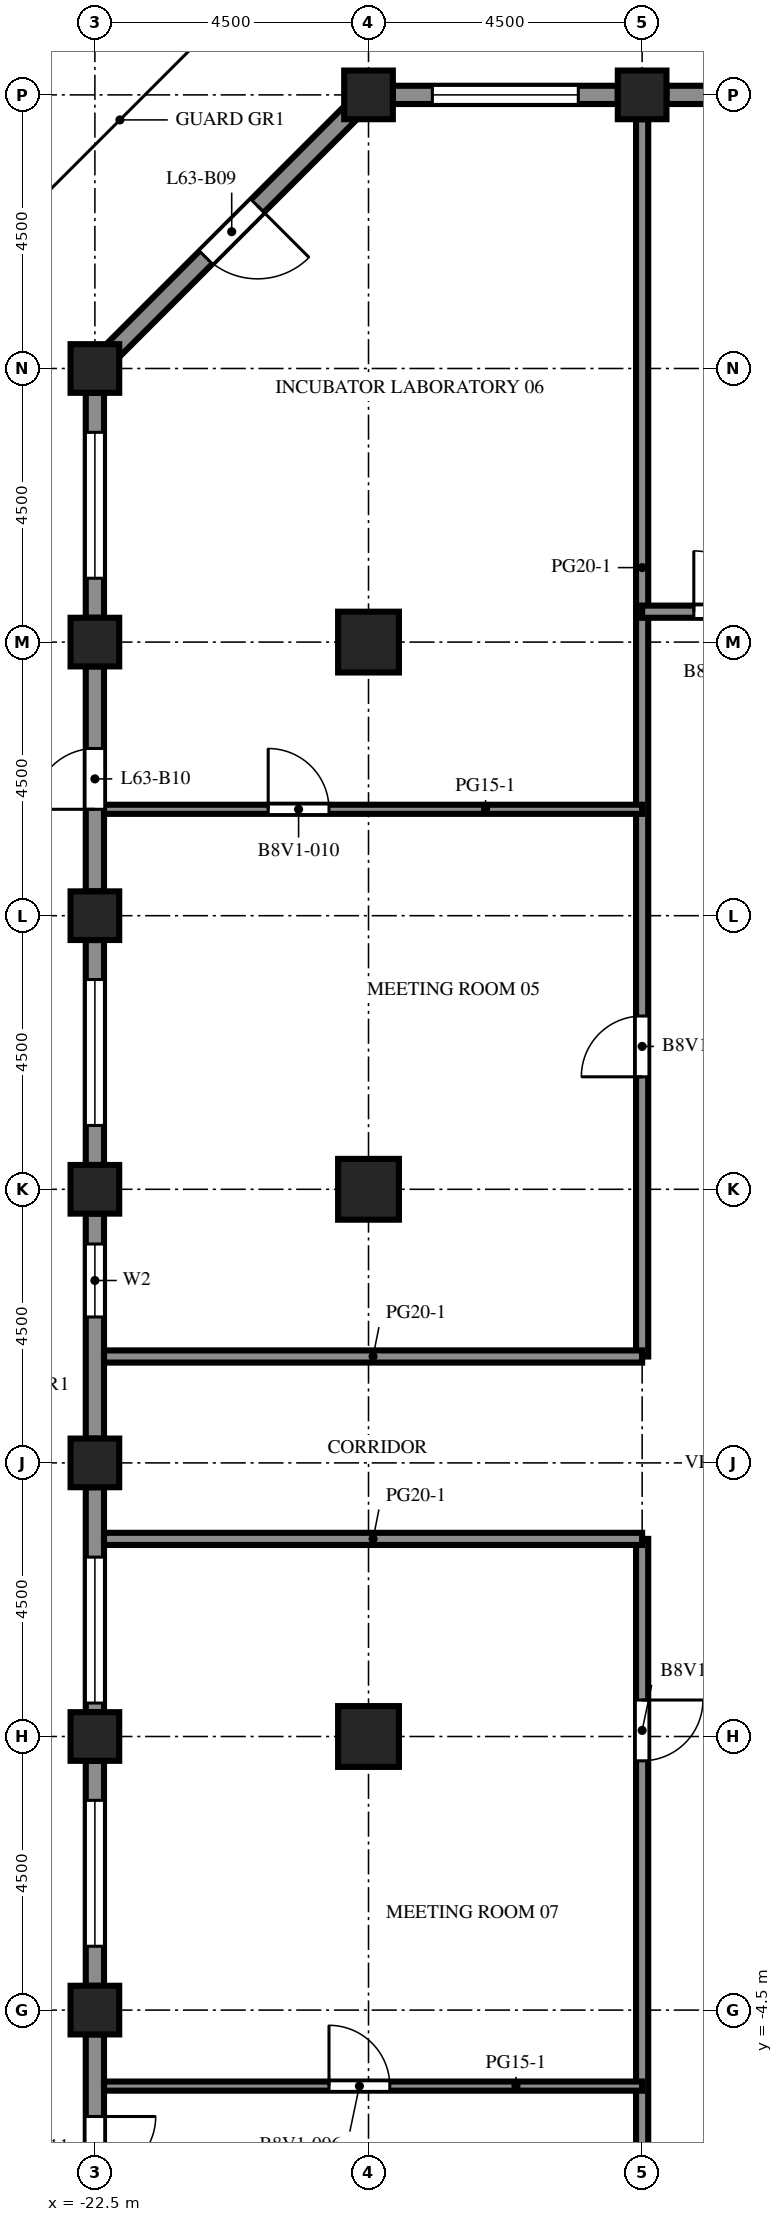
"""IFC4 building model, lengths in metres.
Left out: names, types, materials, properties, quantities, classifications, styles, units other than length and angle.
Written with IfcOpenShell. Run it as: python <this file> out.ifc"""

import sys

from ifc_helpers import new_model, si_unit, direction, frame, frame_2d, origin, origin_2d, place, context, subcontext, project, spatial, rectangle, extrude, element, fill, save


model = new_model("IFC4")
c1 = context("Model", 3, precision=1e-05, world=origin(), true_north=direction((0.0, 1.0)))
c2 = subcontext(c1, "Body", "Model", "MODEL_VIEW")
j1 = project(units=[si_unit("LENGTHUNIT", "METRE"), si_unit("PLANEANGLEUNIT", "RADIAN")], contexts=[c1])
p1 = place(None, origin())
s1 = spatial("IfcSite", under=j1, at=p1, CompositionType="ELEMENT")
p2 = place(p1, origin())
s2 = spatial("IfcBuilding", under=s1, at=p2, CompositionType="ELEMENT")
p3 = place(p2, frame((0.0, 0.0, 278.6)))
s3 = spatial("IfcBuildingStorey", under=s2, at=p3, CompositionType="ELEMENT", Elevation=278.6)
for number, where, z_axis, x_axis in (
    (1, (-22.5, -4.5, 0.0), (0.0, 0.0, 1.0), (1.0, 0.0, 0.0)),
    (2, (-22.5, 0.0, 0.0), (0.0, 0.0, 1.0), (1.0, 0.0, 0.0)),
    (3, (-22.5, 4.5, 0.0), (0.0, 0.0, 1.0), (1.0, 0.0, 0.0)),
    (4, (-22.5, 9.0, 0.0), (0.0, 0.0, 1.0), (1.0, 0.0, 0.0)),
    (5, (-22.5, 13.5, 0.0), (0.0, 0.0, 1.0), (1.0, 0.0, 0.0)),
    (6, (-22.5, 18.0, 0.0), (0.0, 0.0, 1.0), (1.0, 0.0, 0.0)),
    (7, (-22.5, 22.5, 0.0), (0.0, 0.0, 1.0), (1.0, 0.0, 0.0)),
    (8, (-18.0, 27.0, 0.0), (0.0, 0.0, 1.0), (1.0, 0.0, 0.0)),
    (9, (-13.5, 27.0, 0.0), (0.0, 0.0, 1.0), (1.0, 0.0, 0.0)),
):
    element("IfcColumn", number, at=place(p3, frame(where, z_axis=z_axis, x_axis=x_axis)), inside=s3, PredefinedType="COLUMN", context=c2, shape_type="SweptSolid", body=[
        extrude(rectangle(XDim=0.8, YDim=0.8, at=origin_2d()), origin(), (0.0, 0.0, 1.0), 4.1),
    ])
for number, where, z_axis, x_axis in (
    (10, (-18.0, 0.0, 0.0), (0.0, 0.0, 1.0), (1.0, 0.0, 0.0)),
    (11, (-18.0, 9.0, 0.0), (0.0, 0.0, 1.0), (1.0, 0.0, 0.0)),
    (12, (-18.0, 18.0, 0.0), (0.0, 0.0, 1.0), (1.0, 0.0, 0.0)),
):
    element("IfcColumn", number, at=place(p3, frame(where, z_axis=z_axis, x_axis=x_axis)), inside=s3, PredefinedType="COLUMN", context=c2, shape_type="SweptSolid", body=[
        extrude(rectangle(XDim=1.0, YDim=1.0, at=origin_2d()), origin(), (0.0, 0.0, 1.0), 4.1),
    ])
p4 = place(p3, frame((-13.1, 27.0, 0.0), z_axis=(0.0, 0.0, 1.0), x_axis=(1.0, 0.0, 0.0)))
e13 = element("IfcWall", 13, at=p4, inside=s3, PredefinedType="SOLIDWALL", context=c2, shape_type="SweptSolid", body=[
    extrude(rectangle(XDim=3.7, YDim=0.3, at=frame_2d((1.85, 0.0))), origin(), (0.0, 0.0, 1.0), 2.85),
])
p5 = place(p4, frame((1.35, 0.0, 0.0)))
e14 = element("IfcOpeningElement", 14, at=p5, cuts=e13, PredefinedType="OPENING", context=c2, shape_type="SweptSolid", body=[
    extrude(rectangle(XDim=1.0, YDim=2.2, at=frame_2d((0.5, 1.1))), frame((0.0, 0.16, 0.0), z_axis=(0.0, -1.0, 0.0), x_axis=(1.0, 0.0, 0.0)), (0.0, 0.0, 1.0), 0.32),
])
p6 = place(p3, frame((-17.6, 27.0, 0.0), z_axis=(0.0, 0.0, 1.0), x_axis=(1.0, 0.0, 0.0)))
e15 = element("IfcWall", 15, at=p6, inside=s3, PredefinedType="SOLIDWALL", context=c2, shape_type="SweptSolid", body=[
    extrude(rectangle(XDim=3.7, YDim=0.3, at=frame_2d((1.85, 0.0))), origin(), (0.0, 0.0, 1.0), 2.85),
])
p7 = place(p6, frame((0.65, 0.0, 0.8)))
e16 = element("IfcOpeningElement", 16, at=p7, cuts=e15, PredefinedType="OPENING", context=c2, shape_type="SweptSolid", body=[
    extrude(rectangle(XDim=2.4, YDim=1.7, at=frame_2d((1.2, 0.85))), frame((0.0, 0.16, 0.0), z_axis=(0.0, -1.0, 0.0), x_axis=(1.0, 0.0, 0.0)), (0.0, 0.0, 1.0), 0.32),
])
p8 = place(p3, frame((-22.206, 22.794, 0.0), z_axis=(0.0, 0.0, 1.0), x_axis=(0.707106781187, 0.707106781187, 0.0)))
e17 = element("IfcWall", 17, at=p8, inside=s3, PredefinedType="SOLIDWALL", context=c2, shape_type="SweptSolid", body=[
    extrude(rectangle(XDim=5.532, YDim=0.3, at=frame_2d((2.766, 0.0))), origin(), (0.0, 0.0, 1.0), 2.85),
])
p9 = place(p8, frame((2.166, 0.0, 0.0)))
e18 = element("IfcOpeningElement", 18, at=p9, cuts=e17, PredefinedType="OPENING", context=c2, shape_type="SweptSolid", body=[
    extrude(rectangle(XDim=1.2, YDim=2.2, at=frame_2d((0.6, 1.1))), frame((0.0, 0.16, 0.0), z_axis=(0.0, -1.0, 0.0), x_axis=(1.0, 0.0, 0.0)), (0.0, 0.0, 1.0), 0.32),
])
p10 = place(p3, frame((-22.5, 18.4, 0.0), z_axis=(0.0, 0.0, 1.0), x_axis=(0.0, 1.0, 0.0)))
e19 = element("IfcWall", 19, at=p10, inside=s3, PredefinedType="SOLIDWALL", context=c2, shape_type="SweptSolid", body=[
    extrude(rectangle(XDim=3.7, YDim=0.3, at=frame_2d((1.85, 0.0))), origin(), (0.0, 0.0, 1.0), 2.85),
])
p11 = place(p10, frame((0.65, 0.0, 0.8)))
e20 = element("IfcOpeningElement", 20, at=p11, cuts=e19, PredefinedType="OPENING", context=c2, shape_type="SweptSolid", body=[
    extrude(rectangle(XDim=2.4, YDim=1.7, at=frame_2d((1.2, 0.85))), frame((0.0, 0.16, 0.0), z_axis=(0.0, -1.0, 0.0), x_axis=(1.0, 0.0, 0.0)), (0.0, 0.0, 1.0), 0.32),
])
p12 = place(p3, frame((-22.5, 13.9, 0.0), z_axis=(0.0, 0.0, 1.0), x_axis=(0.0, 1.0, 0.0)))
e21 = element("IfcWall", 21, at=p12, inside=s3, PredefinedType="SOLIDWALL", context=c2, shape_type="SweptSolid", body=[
    extrude(rectangle(XDim=3.7, YDim=0.3, at=frame_2d((1.85, 0.0))), origin(), (0.0, 0.0, 1.0), 2.85),
])
p13 = place(p12, frame((1.35, 0.0, 0.0)))
e22 = element("IfcOpeningElement", 22, at=p13, cuts=e21, PredefinedType="OPENING", context=c2, shape_type="SweptSolid", body=[
    extrude(rectangle(XDim=1.0, YDim=2.2, at=frame_2d((0.5, 1.1))), frame((0.0, 0.16, 0.0), z_axis=(0.0, -1.0, 0.0), x_axis=(1.0, 0.0, 0.0)), (0.0, 0.0, 1.0), 0.32),
])
p14 = place(p3, frame((-22.5, 9.4, 0.0), z_axis=(0.0, 0.0, 1.0), x_axis=(0.0, 1.0, 0.0)))
e23 = element("IfcWall", 23, at=p14, inside=s3, PredefinedType="SOLIDWALL", context=c2, shape_type="SweptSolid", body=[
    extrude(rectangle(XDim=3.7, YDim=0.3, at=frame_2d((1.85, 0.0))), origin(), (0.0, 0.0, 1.0), 2.85),
])
p15 = place(p14, frame((0.65, 0.0, 0.8)))
e24 = element("IfcOpeningElement", 24, at=p15, cuts=e23, PredefinedType="OPENING", context=c2, shape_type="SweptSolid", body=[
    extrude(rectangle(XDim=2.4, YDim=1.7, at=frame_2d((1.2, 0.85))), frame((0.0, 0.16, 0.0), z_axis=(0.0, -1.0, 0.0), x_axis=(1.0, 0.0, 0.0)), (0.0, 0.0, 1.0), 0.32),
])
p16 = place(p3, frame((-22.5, 4.9, 0.0), z_axis=(0.0, 0.0, 1.0), x_axis=(0.0, 1.0, 0.0)))
e25 = element("IfcWall", 25, at=p16, inside=s3, PredefinedType="SOLIDWALL", context=c2, shape_type="SweptSolid", body=[
    extrude(rectangle(XDim=3.7, YDim=0.3, at=frame_2d((1.85, 0.0))), origin(), (0.0, 0.0, 1.0), 2.85),
])
p17 = place(p16, frame((2.0, 0.0, 0.8)))
e26 = element("IfcOpeningElement", 26, at=p17, cuts=e25, PredefinedType="OPENING", context=c2, shape_type="SweptSolid", body=[
    extrude(rectangle(XDim=1.2, YDim=1.7, at=frame_2d((0.6, 0.85))), frame((0.0, 0.16, 0.0), z_axis=(0.0, -1.0, 0.0), x_axis=(1.0, 0.0, 0.0)), (0.0, 0.0, 1.0), 0.32),
])
p18 = place(p3, frame((-22.5, 0.4, 0.0), z_axis=(0.0, 0.0, 1.0), x_axis=(0.0, 1.0, 0.0)))
e27 = element("IfcWall", 27, at=p18, inside=s3, PredefinedType="SOLIDWALL", context=c2, shape_type="SweptSolid", body=[
    extrude(rectangle(XDim=3.7, YDim=0.3, at=frame_2d((1.85, 0.0))), origin(), (0.0, 0.0, 1.0), 2.85),
])
p19 = place(p18, frame((0.15, 0.0, 0.8)))
e28 = element("IfcOpeningElement", 28, at=p19, cuts=e27, PredefinedType="OPENING", context=c2, shape_type="SweptSolid", body=[
    extrude(rectangle(XDim=2.4, YDim=1.7, at=frame_2d((1.2, 0.85))), frame((0.0, 0.16, 0.0), z_axis=(0.0, -1.0, 0.0), x_axis=(1.0, 0.0, 0.0)), (0.0, 0.0, 1.0), 0.32),
])
p20 = place(p3, frame((-22.5, -4.1, 0.0), z_axis=(0.0, 0.0, 1.0), x_axis=(0.0, 1.0, 0.0)))
e29 = element("IfcWall", 29, at=p20, inside=s3, PredefinedType="SOLIDWALL", context=c2, shape_type="SweptSolid", body=[
    extrude(rectangle(XDim=3.7, YDim=0.3, at=frame_2d((1.85, 0.0))), origin(), (0.0, 0.0, 1.0), 2.85),
])
p21 = place(p20, frame((0.65, 0.0, 0.8)))
e30 = element("IfcOpeningElement", 30, at=p21, cuts=e29, PredefinedType="OPENING", context=c2, shape_type="SweptSolid", body=[
    extrude(rectangle(XDim=2.4, YDim=1.7, at=frame_2d((1.2, 0.85))), frame((0.0, 0.16, 0.0), z_axis=(0.0, -1.0, 0.0), x_axis=(1.0, 0.0, 0.0)), (0.0, 0.0, 1.0), 0.32),
])
p22 = place(p3, frame((-22.5, -8.6, 0.0), z_axis=(0.0, 0.0, 1.0), x_axis=(0.0, 1.0, 0.0)))
e31 = element("IfcWall", 31, at=p22, inside=s3, PredefinedType="SOLIDWALL", context=c2, shape_type="SweptSolid", body=[
    extrude(rectangle(XDim=3.7, YDim=0.3, at=frame_2d((1.85, 0.0))), origin(), (0.0, 0.0, 1.0), 2.85),
])
p23 = place(p22, frame((1.35, 0.0, 0.0)))
e32 = element("IfcOpeningElement", 32, at=p23, cuts=e31, PredefinedType="OPENING", context=c2, shape_type="SweptSolid", body=[
    extrude(rectangle(XDim=1.0, YDim=2.2, at=frame_2d((0.5, 1.1))), frame((0.0, 0.16, 0.0), z_axis=(0.0, -1.0, 0.0), x_axis=(1.0, 0.0, 0.0)), (0.0, 0.0, 1.0), 0.32),
])
p24 = place(p3, frame((-13.5, -17.6, 0.0), z_axis=(0.0, 0.0, 1.0), x_axis=(0.0, 1.0, 0.0)))
e33 = element("IfcWall", 33, at=p24, inside=s3, PredefinedType="PARTITIONING", context=c2, shape_type="SweptSolid", body=[
    extrude(rectangle(XDim=20.85, YDim=0.2, at=frame_2d((10.425, 0.0))), origin(), (0.0, 0.0, 1.0), 3.65),
])
p25 = place(p24, frame((17.2, 0.0, 0.0)))
e34 = element("IfcOpeningElement", 34, at=p25, cuts=e33, PredefinedType="OPENING", context=c2, shape_type="SweptSolid", body=[
    extrude(rectangle(XDim=1.0, YDim=2.1, at=frame_2d((0.5, 1.05))), frame((0.0, 0.11, 0.0), z_axis=(0.0, -1.0, 0.0), x_axis=(1.0, 0.0, 0.0)), (0.0, 0.0, 1.0), 0.22),
])
p26 = place(p3, frame((-13.5, 6.25, 0.0), z_axis=(0.0, 0.0, 1.0), x_axis=(0.0, 1.0, 0.0)))
e35 = element("IfcWall", 35, at=p26, inside=s3, PredefinedType="PARTITIONING", context=c2, shape_type="SweptSolid", body=[
    extrude(rectangle(XDim=20.35, YDim=0.2, at=frame_2d((10.175, 0.0))), origin(), (0.0, 0.0, 1.0), 3.65),
])
p27 = place(p26, frame((4.6, 0.0, 0.0)))
e36 = element("IfcOpeningElement", 36, at=p27, cuts=e35, PredefinedType="OPENING", context=c2, shape_type="SweptSolid", body=[
    extrude(rectangle(XDim=1.0, YDim=2.1, at=frame_2d((0.5, 1.05))), frame((0.0, 0.11, 0.0), z_axis=(0.0, -1.0, 0.0), x_axis=(1.0, 0.0, 0.0)), (0.0, 0.0, 1.0), 0.22),
])
p28 = place(p3, frame((-13.5, -5.75, 0.0), z_axis=(0.0, 0.0, 1.0), x_axis=(-1.0, 0.0, 0.0)))
e37 = element("IfcWall", 37, at=p28, inside=s3, PredefinedType="PARTITIONING", context=c2, shape_type="SweptSolid", body=[
    extrude(rectangle(XDim=8.85, YDim=0.15, at=frame_2d((4.425, 0.0))), origin(), (0.0, 0.0, 1.0), 3.65),
])
p29 = place(p28, frame((4.15, 0.0, 0.0)))
e38 = element("IfcOpeningElement", 38, at=p29, cuts=e37, PredefinedType="OPENING", context=c2, shape_type="SweptSolid", body=[
    extrude(rectangle(XDim=1.0, YDim=2.1, at=frame_2d((0.5, 1.05))), frame((0.0, 0.085, 0.0), z_axis=(0.0, -1.0, 0.0), x_axis=(1.0, 0.0, 0.0)), (0.0, 0.0, 1.0), 0.17),
])
for number, where, z_axis, x_axis in (
    (39, (-22.35, 3.25, 0.0), (0.0, 0.0, 1.0), (1.0, 0.0, 0.0)),
    (40, (-22.35, 6.25, 0.0), (0.0, 0.0, 1.0), (1.0, 0.0, 0.0)),
):
    element("IfcWall", number, at=place(p3, frame(where, z_axis=z_axis, x_axis=x_axis)), inside=s3, PredefinedType="PARTITIONING", context=c2, shape_type="SweptSolid", body=[
        extrude(rectangle(XDim=8.85, YDim=0.2, at=frame_2d((4.425, 0.0))), origin(), (0.0, 0.0, 1.0), 3.65),
    ])
p30 = place(p3, frame((-22.35, 15.25, 0.0), z_axis=(0.0, 0.0, 1.0), x_axis=(1.0, 0.0, 0.0)))
e41 = element("IfcWall", 41, at=p30, inside=s3, PredefinedType="PARTITIONING", context=c2, shape_type="SweptSolid", body=[
    extrude(rectangle(XDim=8.85, YDim=0.15, at=frame_2d((4.425, 0.0))), origin(), (0.0, 0.0, 1.0), 3.65),
])
p31 = place(p30, frame((2.7, 0.0, 0.0)))
e42 = element("IfcOpeningElement", 42, at=p31, cuts=e41, PredefinedType="OPENING", context=c2, shape_type="SweptSolid", body=[
    extrude(rectangle(XDim=1.0, YDim=2.1, at=frame_2d((0.5, 1.05))), frame((0.0, 0.085, 0.0), z_axis=(0.0, -1.0, 0.0), x_axis=(1.0, 0.0, 0.0)), (0.0, 0.0, 1.0), 0.17),
])
p32 = place(p3, frame((-13.5, 18.5, 0.0), z_axis=(0.0, 0.0, 1.0), x_axis=(1.0, 0.0, 0.0)))
e43 = element("IfcWall", 43, at=p32, inside=s3, PredefinedType="PARTITIONING", context=c2, shape_type="SweptSolid", body=[
    extrude(rectangle(XDim=3.0, YDim=0.2, at=frame_2d((1.5, 0.0))), origin(), (0.0, 0.0, 1.0), 3.65),
])
p33 = place(p32, frame((0.85, 0.0, 0.0)))
e44 = element("IfcOpeningElement", 44, at=p33, cuts=e43, PredefinedType="OPENING", context=c2, shape_type="SweptSolid", body=[
    extrude(rectangle(XDim=1.0, YDim=2.1, at=frame_2d((0.5, 1.05))), frame((0.0, 0.11, 0.0), z_axis=(0.0, -1.0, 0.0), x_axis=(1.0, 0.0, 0.0)), (0.0, 0.0, 1.0), 0.22),
])
p34 = place(p7, origin())
e45 = element("IfcWindow", 45, at=p34, inside=s3, PartitioningType="SINGLE_PANEL", PredefinedType="WINDOW", context=c2, shape_type="SweptSolid", body=[
    extrude(rectangle(XDim=2.4, YDim=1.7, at=frame_2d((1.2, 0.85))), frame((0.0, 0.03, 0.0), z_axis=(0.0, -1.0, 0.0), x_axis=(1.0, 0.0, 0.0)), (0.0, 0.0, 1.0), 0.06),
])
fill(e16, e45)
p35 = place(p9, origin())
e46 = element("IfcDoor", 46, at=p35, inside=s3, OperationType="SINGLE_SWING_RIGHT", PredefinedType="DOOR", context=c2, shape_type="SweptSolid", body=[
    extrude(rectangle(XDim=1.2, YDim=2.2, at=frame_2d((0.6, 1.1))), frame((0.0, 0.025, 0.0), z_axis=(0.0, -1.0, 0.0), x_axis=(1.0, 0.0, 0.0)), (0.0, 0.0, 1.0), 0.05),
])
fill(e18, e46)
p36 = place(p11, origin())
e47 = element("IfcWindow", 47, at=p36, inside=s3, PartitioningType="SINGLE_PANEL", PredefinedType="WINDOW", context=c2, shape_type="SweptSolid", body=[
    extrude(rectangle(XDim=2.4, YDim=1.7, at=frame_2d((1.2, 0.85))), frame((0.0, 0.03, 0.0), z_axis=(0.0, -1.0, 0.0), x_axis=(1.0, 0.0, 0.0)), (0.0, 0.0, 1.0), 0.06),
])
fill(e20, e47)
p37 = place(p13, origin())
e48 = element("IfcDoor", 48, at=p37, inside=s3, OperationType="SINGLE_SWING_LEFT", PredefinedType="DOOR", context=c2, shape_type="SweptSolid", body=[
    extrude(rectangle(XDim=1.0, YDim=2.2, at=frame_2d((0.5, 1.1))), frame((0.0, 0.025, 0.0), z_axis=(0.0, -1.0, 0.0), x_axis=(1.0, 0.0, 0.0)), (0.0, 0.0, 1.0), 0.05),
])
fill(e22, e48)
p38 = place(p15, origin())
e49 = element("IfcWindow", 49, at=p38, inside=s3, PartitioningType="SINGLE_PANEL", PredefinedType="WINDOW", context=c2, shape_type="SweptSolid", body=[
    extrude(rectangle(XDim=2.4, YDim=1.7, at=frame_2d((1.2, 0.85))), frame((0.0, 0.03, 0.0), z_axis=(0.0, -1.0, 0.0), x_axis=(1.0, 0.0, 0.0)), (0.0, 0.0, 1.0), 0.06),
])
fill(e24, e49)
p39 = place(p17, origin())
e50 = element("IfcWindow", 50, at=p39, inside=s3, PartitioningType="SINGLE_PANEL", PredefinedType="WINDOW", context=c2, shape_type="SweptSolid", body=[
    extrude(rectangle(XDim=1.2, YDim=1.7, at=frame_2d((0.6, 0.85))), frame((0.0, 0.03, 0.0), z_axis=(0.0, -1.0, 0.0), x_axis=(1.0, 0.0, 0.0)), (0.0, 0.0, 1.0), 0.06),
])
fill(e26, e50)
p40 = place(p19, origin())
e51 = element("IfcWindow", 51, at=p40, inside=s3, PartitioningType="SINGLE_PANEL", PredefinedType="WINDOW", context=c2, shape_type="SweptSolid", body=[
    extrude(rectangle(XDim=2.4, YDim=1.7, at=frame_2d((1.2, 0.85))), frame((0.0, 0.03, 0.0), z_axis=(0.0, -1.0, 0.0), x_axis=(1.0, 0.0, 0.0)), (0.0, 0.0, 1.0), 0.06),
])
fill(e28, e51)
p41 = place(p21, origin())
e52 = element("IfcWindow", 52, at=p41, inside=s3, PartitioningType="SINGLE_PANEL", PredefinedType="WINDOW", context=c2, shape_type="SweptSolid", body=[
    extrude(rectangle(XDim=2.4, YDim=1.7, at=frame_2d((1.2, 0.85))), frame((0.0, 0.03, 0.0), z_axis=(0.0, -1.0, 0.0), x_axis=(1.0, 0.0, 0.0)), (0.0, 0.0, 1.0), 0.06),
])
fill(e30, e52)
p42 = place(p23, origin())
e53 = element("IfcDoor", 53, at=p42, inside=s3, OperationType="SINGLE_SWING_RIGHT", PredefinedType="DOOR", context=c2, shape_type="SweptSolid", body=[
    extrude(rectangle(XDim=1.0, YDim=2.2, at=frame_2d((0.5, 1.1))), frame((0.0, 0.025, 0.0), z_axis=(0.0, -1.0, 0.0), x_axis=(1.0, 0.0, 0.0)), (0.0, 0.0, 1.0), 0.05),
])
fill(e32, e53)
p43 = place(p25, origin())
e54 = element("IfcDoor", 54, at=p43, inside=s3, OperationType="SINGLE_SWING_RIGHT", PredefinedType="DOOR", context=c2, shape_type="SweptSolid", body=[
    extrude(rectangle(XDim=1.0, YDim=2.1, at=frame_2d((0.5, 1.05))), frame((0.0, 0.025, 0.0), z_axis=(0.0, -1.0, 0.0), x_axis=(1.0, 0.0, 0.0)), (0.0, 0.0, 1.0), 0.05),
])
fill(e34, e54)
p44 = place(p27, origin())
e55 = element("IfcDoor", 55, at=p44, inside=s3, OperationType="SINGLE_SWING_LEFT", PredefinedType="DOOR", context=c2, shape_type="SweptSolid", body=[
    extrude(rectangle(XDim=1.0, YDim=2.1, at=frame_2d((0.5, 1.05))), frame((0.0, 0.025, 0.0), z_axis=(0.0, -1.0, 0.0), x_axis=(1.0, 0.0, 0.0)), (0.0, 0.0, 1.0), 0.05),
])
fill(e36, e55)
p45 = place(p29, origin())
e56 = element("IfcDoor", 56, at=p45, inside=s3, OperationType="SINGLE_SWING_RIGHT", PredefinedType="DOOR", context=c2, shape_type="SweptSolid", body=[
    extrude(rectangle(XDim=1.0, YDim=2.1, at=frame_2d((0.5, 1.05))), frame((0.0, 0.025, 0.0), z_axis=(0.0, -1.0, 0.0), x_axis=(1.0, 0.0, 0.0)), (0.0, 0.0, 1.0), 0.05),
])
fill(e38, e56)
p46 = place(p31, origin())
e57 = element("IfcDoor", 57, at=p46, inside=s3, OperationType="SINGLE_SWING_LEFT", PredefinedType="DOOR", context=c2, shape_type="SweptSolid", body=[
    extrude(rectangle(XDim=1.0, YDim=2.1, at=frame_2d((0.5, 1.05))), frame((0.0, 0.025, 0.0), z_axis=(0.0, -1.0, 0.0), x_axis=(1.0, 0.0, 0.0)), (0.0, 0.0, 1.0), 0.05),
])
fill(e42, e57)
p47 = place(p33, origin())
e58 = element("IfcDoor", 58, at=p47, inside=s3, OperationType="SINGLE_SWING_LEFT", PredefinedType="DOOR", context=c2, shape_type="SweptSolid", body=[
    extrude(rectangle(XDim=1.0, YDim=2.1, at=frame_2d((0.5, 1.05))), frame((0.0, 0.025, 0.0), z_axis=(0.0, -1.0, 0.0), x_axis=(1.0, 0.0, 0.0)), (0.0, 0.0, 1.0), 0.05),
])
fill(e44, e58)
save(model, sys.argv[1])
